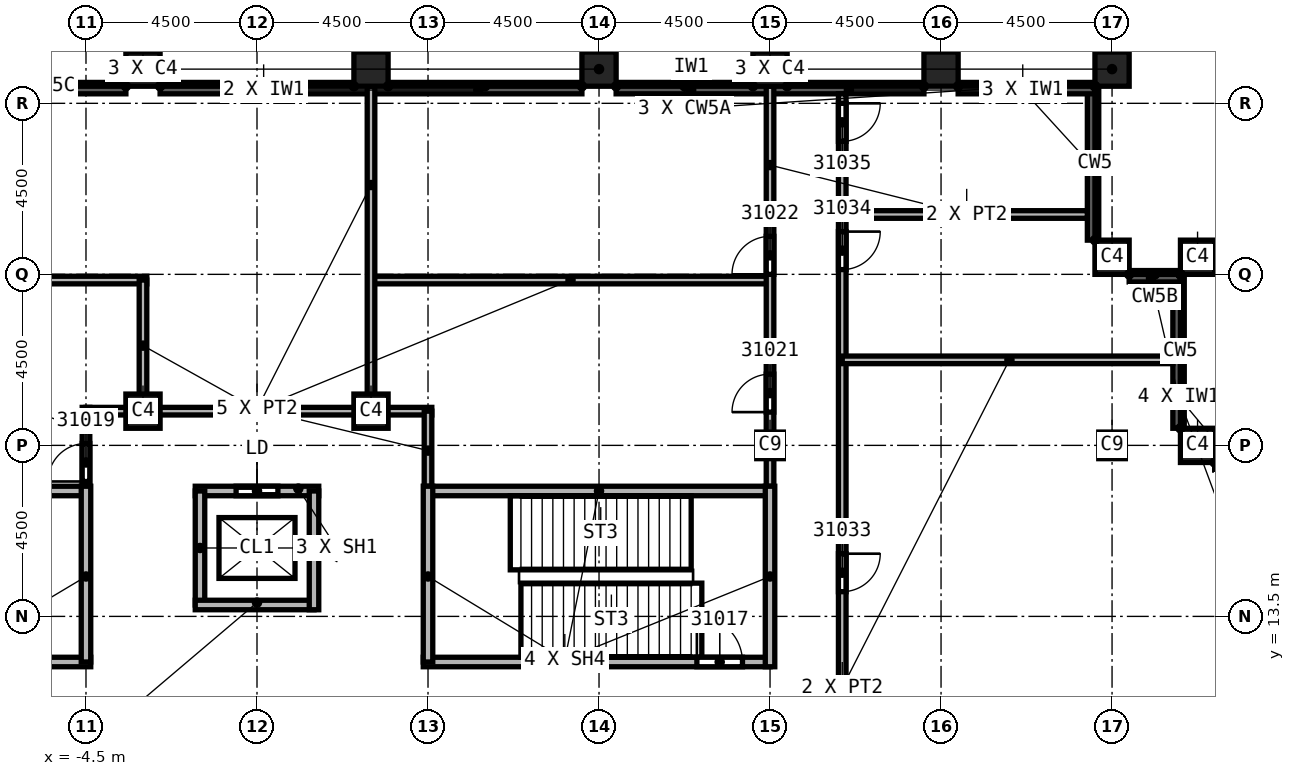
"""IFC4 building model, lengths in metres.
Left out: names, types, materials, properties, quantities, classifications, styles, units other than length and angle.
Written with IfcOpenShell. Run it as: python <this file> out.ifc"""

import sys

from ifc_helpers import new_model, si_unit, direction, frame, frame_2d, origin, origin_2d, place, context, subcontext, project, spatial, rectangle, extrude, element, fill, save


model = new_model("IFC4")
c1 = context("Model", 3, precision=1e-05, world=origin(), true_north=direction((0.0, 1.0)))
c2 = subcontext(c1, "Body", "Model", "MODEL_VIEW")
j1 = project(units=[si_unit("LENGTHUNIT", "METRE"), si_unit("PLANEANGLEUNIT", "RADIAN")], contexts=[c1])
p1 = place(None, origin())
s1 = spatial("IfcSite", under=j1, at=p1, CompositionType="ELEMENT")
p2 = place(p1, origin())
s2 = spatial("IfcBuilding", under=s1, at=p2, CompositionType="ELEMENT")
p3 = place(p2, frame((0.0, 0.0, 350.0)))
s3 = spatial("IfcBuildingStorey", under=s2, at=p3, CompositionType="ELEMENT", Elevation=350.0)
for number, where, z_axis, x_axis in (
    (1, (13.5, 18.0, 0.0), (0.0, 0.0, 1.0), (1.0, 0.0, 0.0)),
    (2, (22.5, 18.0, 0.0), (0.0, 0.0, 1.0), (1.0, 0.0, 0.0)),
):
    element("IfcColumn", number, at=place(p3, frame(where, z_axis=z_axis, x_axis=x_axis)), inside=s3, PredefinedType="COLUMN", context=c2, shape_type="SweptSolid", body=[
        extrude(rectangle(XDim=0.7, YDim=0.7, at=origin_2d()), origin(), (0.0, 0.0, 1.0), 5.6),
    ])
for number, where, z_axis, x_axis in (
    (3, (3.0, 27.9, 0.0), (0.0, 0.0, 1.0), (1.0, 0.0, 0.0)),
    (4, (9.0, 27.9, 0.0), (0.0, 0.0, 1.0), (1.0, 0.0, 0.0)),
    (5, (13.5, 27.9, 0.0), (0.0, 0.0, 1.0), (1.0, 0.0, 0.0)),
    (6, (18.0, 27.9, 0.0), (0.0, 0.0, 1.0), (1.0, 0.0, 0.0)),
    (7, (22.5, 27.9, 0.0), (0.0, 0.0, 1.0), (1.0, 0.0, 0.0)),
    (8, (-3.0, 27.9, 0.0), (0.0, 0.0, 1.0), (1.0, 0.0, 0.0)),
    (9, (3.0, 18.9, 0.0), (0.0, 0.0, 1.0), (1.0, 0.0, 0.0)),
    (10, (-3.0, 18.9, 0.0), (0.0, 0.0, 1.0), (1.0, 0.0, 0.0)),
    (11, (22.5, 22.95, 0.0), (0.0, 0.0, 1.0), (1.0, 0.0, 0.0)),
    (12, (24.75, 22.95, 0.0), (0.0, 0.0, 1.0), (1.0, 0.0, 0.0)),
    (13, (24.75, 18.0, 0.0), (0.0, 0.0, 1.0), (1.0, 0.0, 0.0)),
):
    element("IfcColumn", number, at=place(p3, frame(where, z_axis=z_axis, x_axis=x_axis)), inside=s3, PredefinedType="COLUMN", context=c2, shape_type="SweptSolid", body=[
        extrude(rectangle(XDim=0.9, YDim=0.9, at=origin_2d()), origin(), (0.0, 0.0, 1.0), 5.6),
    ])
p4 = place(p3, frame((24.25, 18.45, 0.0), z_axis=(0.0, 0.0, 1.0), x_axis=(0.0, 1.0, 0.0)))
e14 = element("IfcWall", 14, at=p4, inside=s3, PredefinedType="SOLIDWALL", context=c2, shape_type="SweptSolid", body=[
    extrude(rectangle(XDim=4.05, YDim=0.3, at=frame_2d((2.025, 0.0))), origin(), (0.0, 0.0, 1.0), 1.1),
])
p5 = place(p3, frame((24.3, 22.45, 0.0), z_axis=(0.0, 0.0, 1.0), x_axis=(-1.0, 0.0, 0.0)))
e15 = element("IfcWall", 15, at=p5, inside=s3, PredefinedType="SOLIDWALL", context=c2, shape_type="SweptSolid", body=[
    extrude(rectangle(XDim=1.35, YDim=0.3, at=frame_2d((0.675, 0.0))), origin(), (0.0, 0.0, 1.0), 1.1),
])
p6 = place(p3, frame((22.0, 23.4, 0.0), z_axis=(0.0, 0.0, 1.0), x_axis=(0.0, 1.0, 0.0)))
e16 = element("IfcWall", 16, at=p6, inside=s3, PredefinedType="SOLIDWALL", context=c2, shape_type="SweptSolid", body=[
    extrude(rectangle(XDim=4.05, YDim=0.3, at=frame_2d((2.025, 0.0))), origin(), (0.0, 0.0, 1.0), 1.1),
])
p7 = place(p3, frame((22.05, 27.4, 0.0), z_axis=(0.0, 0.0, 1.0), x_axis=(-1.0, 0.0, 0.0)))
e17 = element("IfcWall", 17, at=p7, inside=s3, PredefinedType="SOLIDWALL", context=c2, shape_type="SweptSolid", body=[
    extrude(rectangle(XDim=3.6, YDim=0.3, at=frame_2d((1.8, 0.0))), origin(), (0.0, 0.0, 1.0), 1.1),
])
for number, where, z_axis, x_axis in (
    (18, (17.55, 27.4, 0.0), (0.0, 0.0, 1.0), (-1.0, 0.0, 0.0)),
    (19, (13.45, 27.4, 0.0), (0.0, 0.0, 1.0), (-1.0, 0.0, 0.0)),
):
    element("IfcWall", number, at=place(p3, frame(where, z_axis=z_axis, x_axis=x_axis)), inside=s3, PredefinedType="SOLIDWALL", context=c2, shape_type="SweptSolid", body=[
        extrude(rectangle(XDim=4.0, YDim=0.3, at=frame_2d((2.0, 0.0))), origin(), (0.0, 0.0, 1.0), 1.1),
    ])
for number, where, z_axis, x_axis in (
    (20, (8.55, 27.4, 0.0), (0.0, 0.0, 1.0), (-1.0, 0.0, 0.0)),
    (21, (2.95, 27.4, 0.0), (0.0, 0.0, 1.0), (-1.0, 0.0, 0.0)),
):
    element("IfcWall", number, at=place(p3, frame(where, z_axis=z_axis, x_axis=x_axis)), inside=s3, PredefinedType="SOLIDWALL", context=c2, shape_type="SweptSolid", body=[
        extrude(rectangle(XDim=5.5, YDim=0.3, at=frame_2d((2.75, 0.0))), origin(), (0.0, 0.0, 1.0), 1.1),
    ])
p8 = place(p3, frame((-3.45, 27.4, 0.0), z_axis=(0.0, 0.0, 1.0), x_axis=(-1.0, 0.0, 0.0)))
e22 = element("IfcWall", 22, at=p8, inside=s3, PredefinedType="SOLIDWALL", context=c2, shape_type="SweptSolid", body=[
    extrude(rectangle(XDim=5.1, YDim=0.3, at=frame_2d((2.55, 0.0))), origin(), (0.0, 0.0, 1.0), 1.1),
])
p9 = place(p3, frame((-13.5, 22.35, 0.0), z_axis=(0.0, 0.0, 1.0), x_axis=(1.0, 0.0, 0.0)))
e23 = element("IfcWall", 23, at=p9, inside=s3, PredefinedType="PARTITIONING", context=c2, shape_type="SweptSolid", body=[
    extrude(rectangle(XDim=10.6, YDim=0.2, at=frame_2d((5.3, 0.0))), origin(), (0.0, 0.0, 1.0), 5.6),
])
p10 = place(p3, frame((-4.5, 16.8, 0.0), z_axis=(0.0, 0.0, 1.0), x_axis=(0.0, 1.0, 0.0)))
e24 = element("IfcWall", 24, at=p10, inside=s3, PredefinedType="PARTITIONING", context=c2, shape_type="SweptSolid", body=[
    extrude(rectangle(XDim=2.2, YDim=0.2, at=frame_2d((1.1, 0.0))), origin(), (0.0, 0.0, 1.0), 5.6),
])
p11 = place(p10, frame((0.25, 0.0, 0.0)))
e25 = element("IfcOpeningElement", 25, at=p11, cuts=e24, PredefinedType="OPENING", context=c2, shape_type="SweptSolid", body=[
    extrude(rectangle(XDim=1.0, YDim=2.1, at=frame_2d((0.5, 1.05))), frame((0.0, 0.1, 0.0), z_axis=(0.0, -1.0, 0.0), x_axis=(1.0, 0.0, 0.0)), (0.0, 0.0, 1.0), 0.2),
])
p12 = place(p3, frame((-4.5, 18.9, 0.0), z_axis=(0.0, 0.0, 1.0), x_axis=(1.0, 0.0, 0.0)))
e26 = element("IfcWall", 26, at=p12, inside=s3, PredefinedType="PARTITIONING", context=c2, shape_type="SweptSolid", body=[
    extrude(rectangle(XDim=9.1, YDim=0.2, at=frame_2d((4.55, 0.0))), origin(), (0.0, 0.0, 1.0), 5.6),
])
p13 = place(p3, frame((-3.0, 22.35, 0.0), z_axis=(0.0, 0.0, 1.0), x_axis=(0.0, -1.0, 0.0)))
e27 = element("IfcWall", 27, at=p13, inside=s3, PredefinedType="PARTITIONING", context=c2, shape_type="SweptSolid", body=[
    extrude(rectangle(XDim=3.45, YDim=0.2, at=frame_2d((1.725, 0.0))), origin(), (0.0, 0.0, 1.0), 5.6),
])
p14 = place(p3, frame((3.0, 22.35, 0.0), z_axis=(0.0, 0.0, 1.0), x_axis=(1.0, 0.0, 0.0)))
e28 = element("IfcWall", 28, at=p14, inside=s3, PredefinedType="PARTITIONING", context=c2, shape_type="SweptSolid", body=[
    extrude(rectangle(XDim=10.5, YDim=0.2, at=frame_2d((5.25, 0.0))), origin(), (0.0, 0.0, 1.0), 5.6),
])
p15 = place(p3, frame((3.0, 27.45, 0.0), z_axis=(0.0, 0.0, 1.0), x_axis=(0.0, -1.0, 0.0)))
e29 = element("IfcWall", 29, at=p15, inside=s3, PredefinedType="PARTITIONING", context=c2, shape_type="SweptSolid", body=[
    extrude(rectangle(XDim=8.55, YDim=0.2, at=frame_2d((4.275, 0.0))), origin(), (0.0, 0.0, 1.0), 5.6),
])
p16 = place(p3, frame((4.5, 18.9, 0.0), z_axis=(0.0, 0.0, 1.0), x_axis=(0.0, -1.0, 0.0)))
e30 = element("IfcWall", 30, at=p16, inside=s3, PredefinedType="PARTITIONING", context=c2, shape_type="SweptSolid", body=[
    extrude(rectangle(XDim=2.1, YDim=0.2, at=frame_2d((1.05, 0.0))), origin(), (0.0, 0.0, 1.0), 5.6),
])
p17 = place(p3, frame((13.5, 16.675, 0.0), z_axis=(0.0, 0.0, 1.0), x_axis=(0.0, 1.0, 0.0)))
e31 = element("IfcWall", 31, at=p17, inside=s3, PredefinedType="PARTITIONING", context=c2, shape_type="SweptSolid", body=[
    extrude(rectangle(XDim=10.775, YDim=0.2, at=frame_2d((5.387, 0.0))), origin(), (0.0, 0.0, 1.0), 5.6),
])
p18 = place(p17, frame((2.2, 0.0, 0.0)))
e32 = element("IfcOpeningElement", 32, at=p18, cuts=e31, PredefinedType="OPENING", context=c2, shape_type="SweptSolid", body=[
    extrude(rectangle(XDim=1.0, YDim=2.1, at=frame_2d((0.5, 1.05))), frame((0.0, 0.1, 0.0), z_axis=(0.0, -1.0, 0.0), x_axis=(1.0, 0.0, 0.0)), (0.0, 0.0, 1.0), 0.2),
])
p19 = place(p17, frame((5.825, 0.0, 0.0)))
e33 = element("IfcOpeningElement", 33, at=p19, cuts=e31, PredefinedType="OPENING", context=c2, shape_type="SweptSolid", body=[
    extrude(rectangle(XDim=1.0, YDim=2.1, at=frame_2d((0.5, 1.05))), frame((0.0, 0.1, 0.0), z_axis=(0.0, -1.0, 0.0), x_axis=(1.0, 0.0, 0.0)), (0.0, 0.0, 1.0), 0.2),
])
p20 = place(p3, frame((15.4, 27.25, 0.0), z_axis=(0.0, 0.0, 1.0), x_axis=(0.0, -1.0, 0.0)))
e34 = element("IfcWall", 34, at=p20, inside=s3, PredefinedType="PARTITIONING", context=c2, shape_type="SweptSolid", body=[
    extrude(rectangle(XDim=54.5, YDim=0.2, at=frame_2d((27.25, 0.0))), origin(), (0.0, 0.0, 1.0), 5.6),
])
p21 = place(p20, frame((23.2, 0.0, 0.0)))
e35 = element("IfcOpeningElement", 35, at=p21, cuts=e34, PredefinedType="OPENING", context=c2, shape_type="SweptSolid", body=[
    extrude(rectangle(XDim=1.0, YDim=2.1, at=frame_2d((0.5, 1.05))), frame((0.0, 0.1, 0.0), z_axis=(0.0, -1.0, 0.0), x_axis=(1.0, 0.0, 0.0)), (0.0, 0.0, 1.0), 0.2),
])
p22 = place(p20, frame((12.1, 0.0, 0.0)))
e36 = element("IfcOpeningElement", 36, at=p22, cuts=e34, PredefinedType="OPENING", context=c2, shape_type="SweptSolid", body=[
    extrude(rectangle(XDim=1.0, YDim=2.1, at=frame_2d((0.5, 1.05))), frame((0.0, 0.1, 0.0), z_axis=(0.0, -1.0, 0.0), x_axis=(1.0, 0.0, 0.0)), (0.0, 0.0, 1.0), 0.2),
])
p23 = place(p20, frame((3.625, 0.0, 0.0)))
e37 = element("IfcOpeningElement", 37, at=p23, cuts=e34, PredefinedType="OPENING", context=c2, shape_type="SweptSolid", body=[
    extrude(rectangle(XDim=1.0, YDim=2.1, at=frame_2d((0.5, 1.05))), frame((0.0, 0.1, 0.0), z_axis=(0.0, -1.0, 0.0), x_axis=(1.0, 0.0, 0.0)), (0.0, 0.0, 1.0), 0.2),
])
p24 = place(p20, frame((0.25, 0.0, 0.0)))
e38 = element("IfcOpeningElement", 38, at=p24, cuts=e34, PredefinedType="OPENING", context=c2, shape_type="SweptSolid", body=[
    extrude(rectangle(XDim=1.0, YDim=2.1, at=frame_2d((0.5, 1.05))), frame((0.0, 0.1, 0.0), z_axis=(0.0, -1.0, 0.0), x_axis=(1.0, 0.0, 0.0)), (0.0, 0.0, 1.0), 0.2),
])
p25 = place(p20, frame((49.9, 0.0, 0.0)))
e39 = element("IfcOpeningElement", 39, at=p25, cuts=e34, PredefinedType="OPENING", context=c2, shape_type="SweptSolid", body=[
    extrude(rectangle(XDim=1.0, YDim=2.1, at=frame_2d((0.5, 1.05))), frame((0.0, 0.1, 0.0), z_axis=(0.0, -1.0, 0.0), x_axis=(1.0, 0.0, 0.0)), (0.0, 0.0, 1.0), 0.2),
])
p26 = place(p20, frame((48.55, 0.0, 0.0)))
e40 = element("IfcOpeningElement", 40, at=p26, cuts=e34, PredefinedType="OPENING", context=c2, shape_type="SweptSolid", body=[
    extrude(rectangle(XDim=1.0, YDim=2.1, at=frame_2d((0.5, 1.05))), frame((0.0, 0.1, 0.0), z_axis=(0.0, -1.0, 0.0), x_axis=(1.0, 0.0, 0.0)), (0.0, 0.0, 1.0), 0.2),
])
p27 = place(p20, frame((44.05, 0.0, 0.0)))
e41 = element("IfcOpeningElement", 41, at=p27, cuts=e34, PredefinedType="OPENING", context=c2, shape_type="SweptSolid", body=[
    extrude(rectangle(XDim=1.0, YDim=2.1, at=frame_2d((0.5, 1.05))), frame((0.0, 0.1, 0.0), z_axis=(0.0, -1.0, 0.0), x_axis=(1.0, 0.0, 0.0)), (0.0, 0.0, 1.0), 0.2),
])
p28 = place(p20, frame((38.95, 0.0, 0.0)))
e42 = element("IfcOpeningElement", 42, at=p28, cuts=e34, PredefinedType="OPENING", context=c2, shape_type="SweptSolid", body=[
    extrude(rectangle(XDim=1.0, YDim=2.1, at=frame_2d((0.5, 1.05))), frame((0.0, 0.1, 0.0), z_axis=(0.0, -1.0, 0.0), x_axis=(1.0, 0.0, 0.0)), (0.0, 0.0, 1.0), 0.2),
])
p29 = place(p20, frame((31.3, 0.0, 0.0)))
e43 = element("IfcOpeningElement", 43, at=p29, cuts=e34, PredefinedType="OPENING", context=c2, shape_type="SweptSolid", body=[
    extrude(rectangle(XDim=1.0, YDim=2.1, at=frame_2d((0.5, 1.05))), frame((0.0, 0.1, 0.0), z_axis=(0.0, -1.0, 0.0), x_axis=(1.0, 0.0, 0.0)), (0.0, 0.0, 1.0), 0.2),
])
p30 = place(p3, frame((15.4, 20.25, 0.0), z_axis=(0.0, 0.0, 1.0), x_axis=(1.0, 0.0, 0.0)))
e44 = element("IfcWall", 44, at=p30, inside=s3, PredefinedType="PARTITIONING", context=c2, shape_type="SweptSolid", body=[
    extrude(rectangle(XDim=8.7, YDim=0.2, at=frame_2d((4.35, 0.0))), origin(), (0.0, 0.0, 1.0), 5.6),
])
p31 = place(p3, frame((15.4, 24.075, 0.0), z_axis=(0.0, 0.0, 1.0), x_axis=(1.0, 0.0, 0.0)))
e45 = element("IfcWall", 45, at=p31, inside=s3, PredefinedType="PARTITIONING", context=c2, shape_type="SweptSolid", body=[
    extrude(rectangle(XDim=6.45, YDim=0.2, at=frame_2d((3.225, 0.0))), origin(), (0.0, 0.0, 1.0), 5.6),
])
p32 = place(p3, frame((-1.625, 16.8, 0.0), z_axis=(0.0, 0.0, 1.0), x_axis=(1.0, 0.0, 0.0)))
e46 = element("IfcWall", 46, at=p32, inside=s3, PredefinedType="SOLIDWALL", context=c2, shape_type="SweptSolid", body=[
    extrude(rectangle(XDim=3.25, YDim=0.25, at=frame_2d((1.625, 0.0))), origin(), (0.0, 0.0, 1.0), 5.6),
])
p33 = place(p32, frame((1.075, 0.0, 0.0)))
e47 = element("IfcOpeningElement", 47, at=p33, cuts=e46, PredefinedType="OPENING", context=c2, shape_type="SweptSolid", body=[
    extrude(rectangle(XDim=1.1, YDim=2.1, at=frame_2d((0.55, 1.05))), frame((0.0, 0.125, 0.0), z_axis=(0.0, -1.0, 0.0), x_axis=(1.0, 0.0, 0.0)), (0.0, 0.0, 1.0), 0.25),
])
p34 = place(p3, frame((-1.5, 13.8, 0.0), z_axis=(0.0, 0.0, 1.0), x_axis=(0.0, 1.0, 0.0)))
e48 = element("IfcWall", 48, at=p34, inside=s3, PredefinedType="SOLIDWALL", context=c2, shape_type="SweptSolid", body=[
    extrude(rectangle(XDim=3.0, YDim=0.25, at=frame_2d((1.5, 0.0))), origin(), (0.0, 0.0, 1.0), 5.6),
])
for number, where, z_axis, x_axis in (
    (49, (1.5, 13.8, 0.0), (0.0, 0.0, 1.0), (-1.0, 0.0, 0.0)),
    (50, (1.5, 16.8, 0.0), (0.0, 0.0, 1.0), (0.0, -1.0, 0.0)),
):
    element("IfcWall", number, at=place(p3, frame(where, z_axis=z_axis, x_axis=x_axis)), inside=s3, PredefinedType="SOLIDWALL", context=c2, shape_type="SweptSolid", body=[
        extrude(rectangle(XDim=3.125, YDim=0.25, at=frame_2d((1.562, 0.0))), origin(), (0.0, 0.0, 1.0), 5.6),
    ])
p35 = place(p3, frame((-13.5, 12.3, 0.0), z_axis=(0.0, 0.0, 1.0), x_axis=(1.0, 0.0, 0.0)))
e51 = element("IfcWall", 51, at=p35, inside=s3, PredefinedType="SOLIDWALL", context=c2, shape_type="SweptSolid", body=[
    extrude(rectangle(XDim=9.125, YDim=0.25, at=frame_2d((4.562, 0.0))), origin(), (0.0, 0.0, 1.0), 5.6),
])
p36 = place(p35, frame((0.6, 0.0, 0.0)))
e52 = element("IfcOpeningElement", 52, at=p36, cuts=e51, PredefinedType="OPENING", context=c2, shape_type="SweptSolid", body=[
    extrude(rectangle(XDim=1.2, YDim=2.1, at=frame_2d((0.6, 1.05))), frame((0.0, 0.125, 0.0), z_axis=(0.0, -1.0, 0.0), x_axis=(1.0, 0.0, 0.0)), (0.0, 0.0, 1.0), 0.25),
])
p37 = place(p3, frame((-13.5, 16.8, 0.0), z_axis=(0.0, 0.0, 1.0), x_axis=(1.0, 0.0, 0.0)))
e53 = element("IfcWall", 53, at=p37, inside=s3, PredefinedType="SOLIDWALL", context=c2, shape_type="SweptSolid", body=[
    extrude(rectangle(XDim=9.1, YDim=0.25, at=frame_2d((4.55, 0.0))), origin(), (0.0, 0.0, 1.0), 5.6),
])
p38 = place(p3, frame((-4.5, 16.925, 0.0), z_axis=(0.0, 0.0, 1.0), x_axis=(0.0, -1.0, 0.0)))
e54 = element("IfcWall", 54, at=p38, inside=s3, PredefinedType="SOLIDWALL", context=c2, shape_type="SweptSolid", body=[
    extrude(rectangle(XDim=4.625, YDim=0.25, at=frame_2d((2.312, 0.0))), origin(), (0.0, 0.0, 1.0), 5.6),
])
p39 = place(p3, frame((4.375, 12.3, 0.0), z_axis=(0.0, 0.0, 1.0), x_axis=(1.0, 0.0, 0.0)))
e55 = element("IfcWall", 55, at=p39, inside=s3, PredefinedType="SOLIDWALL", context=c2, shape_type="SweptSolid", body=[
    extrude(rectangle(XDim=9.125, YDim=0.25, at=frame_2d((4.562, 0.0))), origin(), (0.0, 0.0, 1.0), 5.6),
])
p40 = place(p39, frame((7.2, 0.0, 0.0)))
e56 = element("IfcOpeningElement", 56, at=p40, cuts=e55, PredefinedType="OPENING", context=c2, shape_type="SweptSolid", body=[
    extrude(rectangle(XDim=1.2, YDim=2.1, at=frame_2d((0.6, 1.05))), frame((0.0, 0.125, 0.0), z_axis=(0.0, -1.0, 0.0), x_axis=(1.0, 0.0, 0.0)), (0.0, 0.0, 1.0), 0.25),
])
p41 = place(p3, frame((4.4, 16.8, 0.0), z_axis=(0.0, 0.0, 1.0), x_axis=(1.0, 0.0, 0.0)))
e57 = element("IfcWall", 57, at=p41, inside=s3, PredefinedType="SOLIDWALL", context=c2, shape_type="SweptSolid", body=[
    extrude(rectangle(XDim=9.1, YDim=0.25, at=frame_2d((4.55, 0.0))), origin(), (0.0, 0.0, 1.0), 5.6),
])
p42 = place(p3, frame((4.5, 12.3, 0.0), z_axis=(0.0, 0.0, 1.0), x_axis=(0.0, 1.0, 0.0)))
e58 = element("IfcWall", 58, at=p42, inside=s3, PredefinedType="SOLIDWALL", context=c2, shape_type="SweptSolid", body=[
    extrude(rectangle(XDim=4.625, YDim=0.25, at=frame_2d((2.312, 0.0))), origin(), (0.0, 0.0, 1.0), 5.6),
])
p43 = place(p3, frame((13.5, 12.175, 0.0), z_axis=(0.0, 0.0, 1.0), x_axis=(0.0, 1.0, 0.0)))
e59 = element("IfcWall", 59, at=p43, inside=s3, PredefinedType="SOLIDWALL", context=c2, shape_type="SweptSolid", body=[
    extrude(rectangle(XDim=4.75, YDim=0.25, at=frame_2d((2.375, 0.0))), origin(), (0.0, 0.0, 1.0), 5.6),
])
p44 = place(p40, origin())
e60 = element("IfcDoor", 60, at=p44, inside=s3, OperationType="SINGLE_SWING_RIGHT", PredefinedType="DOOR", context=c2, shape_type="SweptSolid", body=[
    extrude(rectangle(XDim=1.2, YDim=2.1, at=frame_2d((0.6, 1.05))), frame((0.0, 0.025, 0.0), z_axis=(0.0, -1.0, 0.0), x_axis=(1.0, 0.0, 0.0)), (0.0, 0.0, 1.0), 0.05),
])
fill(e56, e60)
p45 = place(p11, origin())
e61 = element("IfcDoor", 61, at=p45, inside=s3, OperationType="SINGLE_SWING_RIGHT", PredefinedType="DOOR", context=c2, shape_type="SweptSolid", body=[
    extrude(rectangle(XDim=1.0, YDim=2.1, at=frame_2d((0.5, 1.05))), frame((0.0, 0.025, 0.0), z_axis=(0.0, -1.0, 0.0), x_axis=(1.0, 0.0, 0.0)), (0.0, 0.0, 1.0), 0.05),
])
fill(e25, e61)
p46 = place(p18, origin())
e62 = element("IfcDoor", 62, at=p46, inside=s3, OperationType="SINGLE_SWING_RIGHT", PredefinedType="DOOR", context=c2, shape_type="SweptSolid", body=[
    extrude(rectangle(XDim=1.0, YDim=2.1, at=frame_2d((0.5, 1.05))), frame((0.0, 0.025, 0.0), z_axis=(0.0, -1.0, 0.0), x_axis=(1.0, 0.0, 0.0)), (0.0, 0.0, 1.0), 0.05),
])
fill(e32, e62)
p47 = place(p19, origin())
e63 = element("IfcDoor", 63, at=p47, inside=s3, OperationType="SINGLE_SWING_LEFT", PredefinedType="DOOR", context=c2, shape_type="SweptSolid", body=[
    extrude(rectangle(XDim=1.0, YDim=2.1, at=frame_2d((0.5, 1.05))), frame((0.0, 0.025, 0.0), z_axis=(0.0, -1.0, 0.0), x_axis=(1.0, 0.0, 0.0)), (0.0, 0.0, 1.0), 0.05),
])
fill(e33, e63)
p48 = place(p22, origin())
e64 = element("IfcDoor", 64, at=p48, inside=s3, OperationType="SINGLE_SWING_RIGHT", PredefinedType="DOOR", context=c2, shape_type="SweptSolid", body=[
    extrude(rectangle(XDim=1.0, YDim=2.1, at=frame_2d((0.5, 1.05))), frame((0.0, 0.025, 0.0), z_axis=(0.0, -1.0, 0.0), x_axis=(1.0, 0.0, 0.0)), (0.0, 0.0, 1.0), 0.05),
])
fill(e36, e64)
p49 = place(p23, origin())
e65 = element("IfcDoor", 65, at=p49, inside=s3, OperationType="SINGLE_SWING_LEFT", PredefinedType="DOOR", context=c2, shape_type="SweptSolid", body=[
    extrude(rectangle(XDim=1.0, YDim=2.1, at=frame_2d((0.5, 1.05))), frame((0.0, 0.025, 0.0), z_axis=(0.0, -1.0, 0.0), x_axis=(1.0, 0.0, 0.0)), (0.0, 0.0, 1.0), 0.05),
])
fill(e37, e65)
p50 = place(p24, origin())
e66 = element("IfcDoor", 66, at=p50, inside=s3, OperationType="SINGLE_SWING_RIGHT", PredefinedType="DOOR", context=c2, shape_type="SweptSolid", body=[
    extrude(rectangle(XDim=1.0, YDim=2.1, at=frame_2d((0.5, 1.05))), frame((0.0, 0.025, 0.0), z_axis=(0.0, -1.0, 0.0), x_axis=(1.0, 0.0, 0.0)), (0.0, 0.0, 1.0), 0.05),
])
fill(e38, e66)
p51 = place(p33, origin())
e67 = element("IfcDoor", 67, at=p51, inside=s3, OperationType="SLIDING_TO_LEFT", PredefinedType="DOOR", context=c2, shape_type="SweptSolid", body=[
    extrude(rectangle(XDim=1.1, YDim=2.1, at=frame_2d((0.55, 1.05))), frame((0.0, 0.025, 0.0), z_axis=(0.0, -1.0, 0.0), x_axis=(1.0, 0.0, 0.0)), (0.0, 0.0, 1.0), 0.05),
])
fill(e47, e67)
save(model, sys.argv[1])
